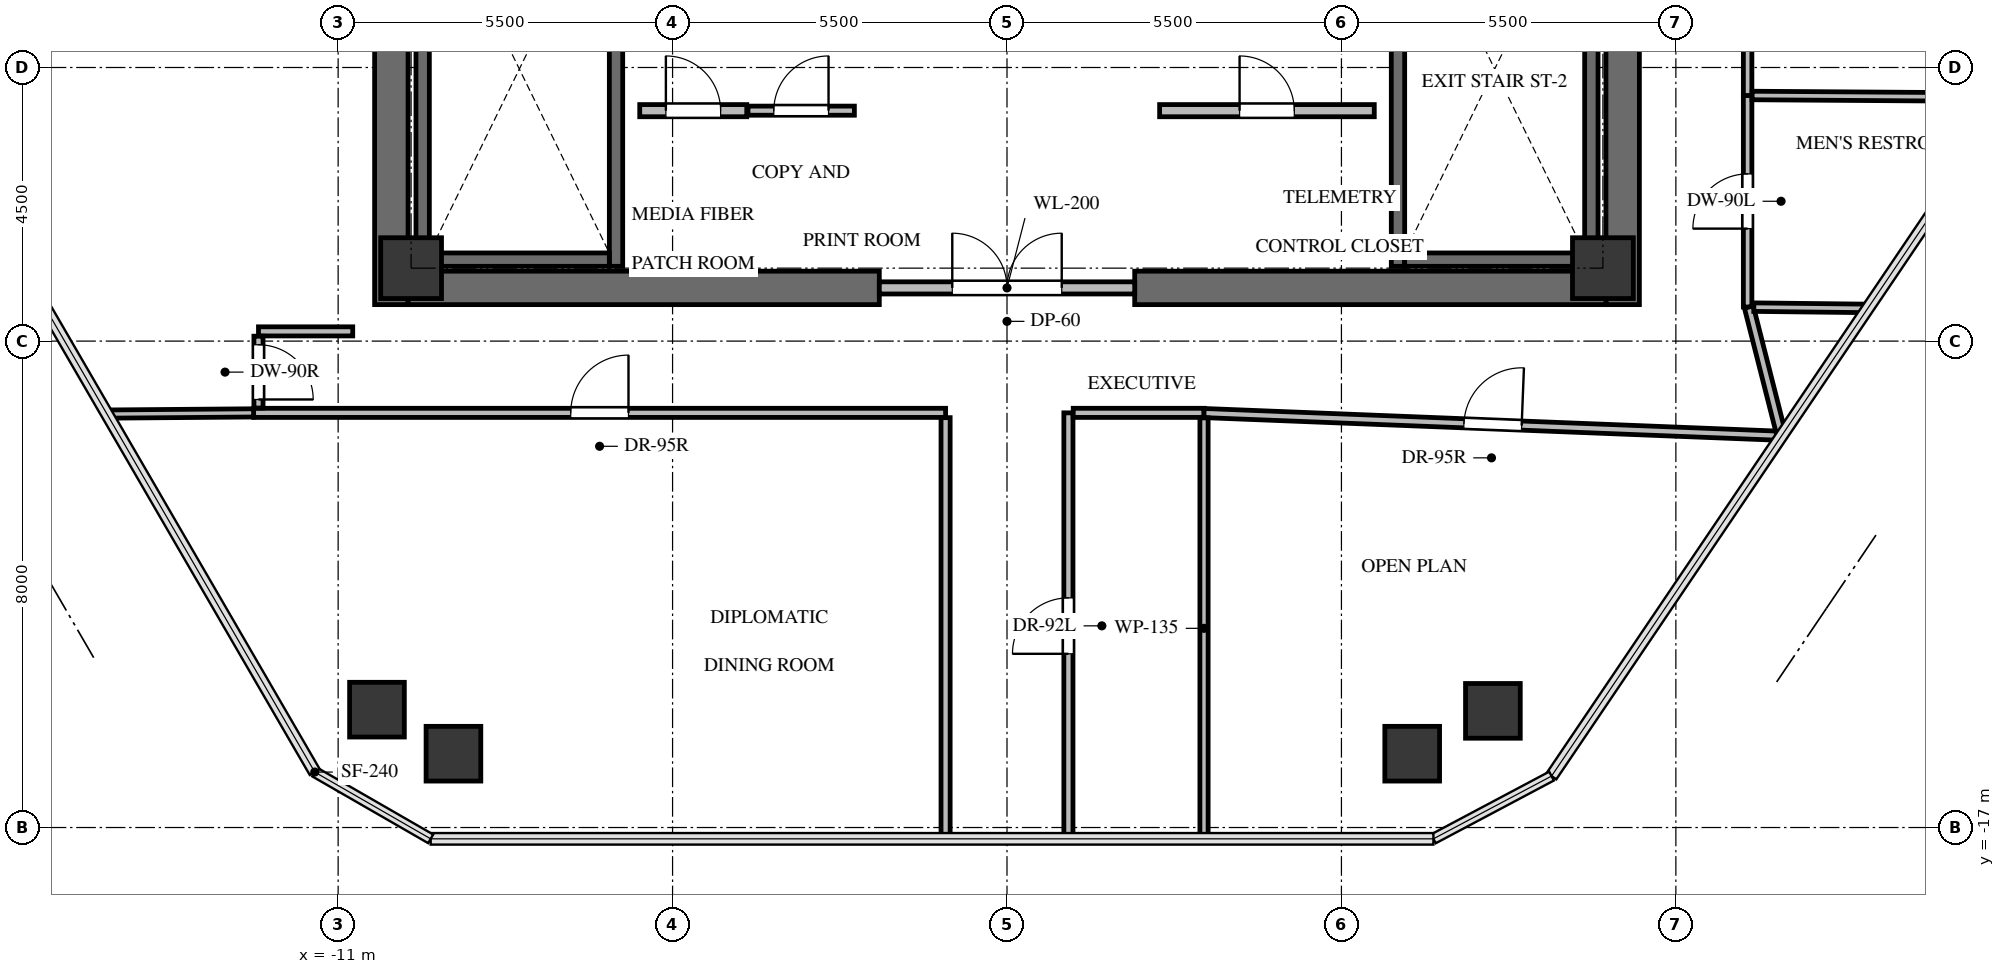
"""IFC4 building model, lengths in metres.
Left out: names, types, materials, properties, quantities, classifications, styles, units other than length and angle.
Written with IfcOpenShell. Run it as: python <this file> out.ifc"""

import sys

from ifc_helpers import new_model, si_unit, direction, frame, frame_2d, origin, origin_2d, place, context, subcontext, project, spatial, rectangle, extrude, source, transform, mapped, element, fill, save


model = new_model("IFC4")
c1 = context("Model", 3, precision=1e-05, world=origin(), true_north=direction((0.0, 1.0)))
c2 = subcontext(c1, "Body", "Model", "MODEL_VIEW")
j1 = project(units=[si_unit("LENGTHUNIT", "METRE"), si_unit("PLANEANGLEUNIT", "RADIAN")], contexts=[c1])
p1 = place(None, origin())
s1 = spatial("IfcSite", under=j1, at=p1, CompositionType="ELEMENT")
p2 = place(p1, origin())
s2 = spatial("IfcBuilding", under=s1, at=p2, CompositionType="ELEMENT")
p3 = place(p2, frame((0.0, 0.0, 218.3)))
s3 = spatial("IfcBuildingStorey", under=s2, at=p3, CompositionType="ELEMENT", Elevation=218.3)
for number, where, z_axis, x_axis in (
    (1, (-10.125, -8.4, 0.0), (0.0, 0.0, 1.0), (0.0, 1.0, 0.0)),
    (2, (10.125, -8.4, 0.0), (0.0, 0.0, 1.0), (0.0, 1.0, 0.0)),
):
    element("IfcWall", number, at=place(p3, frame(where, z_axis=z_axis, x_axis=x_axis)), inside=s3, PredefinedType="SHEAR", context=c2, shape_type="SweptSolid", body=[
        extrude(rectangle(XDim=16.8, YDim=0.55, at=frame_2d((8.4, 0.0))), origin(), (0.0, 0.0, 1.0), 3.3),
    ])
for number, where, z_axis, x_axis in (
    (3, (-9.85, -8.125, 0.0), (0.0, 0.0, 1.0), (1.0, 0.0, 0.0)),
    (4, (2.1, -8.125, 0.0), (0.0, 0.0, 1.0), (1.0, 0.0, 0.0)),
):
    element("IfcWall", number, at=place(p3, frame(where, z_axis=z_axis, x_axis=x_axis)), inside=s3, PredefinedType="SHEAR", context=c2, shape_type="SweptSolid", body=[
        extrude(rectangle(XDim=7.75, YDim=0.55, at=frame_2d((3.875, 0.0))), origin(), (0.0, 0.0, 1.0), 3.3),
    ])
p4 = place(p3, frame((-6.43, -7.77, -0.24), z_axis=(0.0, 0.0, 1.0), x_axis=(0.0, 1.0, 0.0)))
e5 = element("IfcWall", 5, at=p4, inside=s3, PredefinedType="SHEAR", context=c2, shape_type="SweptSolid", body=[
    extrude(rectangle(XDim=7.89, YDim=0.22, at=frame_2d((3.945, 0.0))), origin(), (0.0, 0.0, 1.0), 3.3),
])
p5 = place(p4, frame((6.32, 0.0, 0.0)))
e6 = element("IfcOpeningElement", 6, at=p5, cuts=e5, PredefinedType="OPENING", context=c2, shape_type="SweptSolid", body=[
    extrude(rectangle(XDim=1.05, YDim=2.15, at=frame_2d((0.525, 1.075))), frame((0.0, 0.12, 0.0), z_axis=(0.0, -1.0, 0.0), x_axis=(1.0, 0.0, 0.0)), (0.0, 0.0, 1.0), 0.24),
])
p6 = place(p3, frame((-9.61, 0.12, -0.24), z_axis=(0.0, 0.0, 1.0), x_axis=(0.0, -1.0, 0.0)))
e7 = element("IfcWall", 7, at=p6, inside=s3, PredefinedType="SHEAR", context=c2, shape_type="SweptSolid", body=[
    extrude(rectangle(XDim=7.89, YDim=0.22, at=frame_2d((3.945, 0.0))), origin(), (0.0, 0.0, 1.0), 3.3),
])
p7 = place(p3, frame((-9.5, -7.66, -0.24), z_axis=(0.0, 0.0, 1.0), x_axis=(1.0, 0.0, 0.0)))
e8 = element("IfcWall", 8, at=p7, inside=s3, PredefinedType="SHEAR", context=c2, shape_type="SweptSolid", body=[
    extrude(rectangle(XDim=2.96, YDim=0.22, at=frame_2d((1.48, 0.0))), origin(), (0.0, 0.0, 1.0), 3.3),
])
p8 = place(p3, frame((9.61, -7.77, -0.24), z_axis=(0.0, 0.0, 1.0), x_axis=(0.0, 1.0, 0.0)))
e9 = element("IfcWall", 9, at=p8, inside=s3, PredefinedType="SHEAR", context=c2, shape_type="SweptSolid", body=[
    extrude(rectangle(XDim=7.89, YDim=0.22, at=frame_2d((3.945, 0.0))), origin(), (0.0, 0.0, 1.0), 3.3),
])
p9 = place(p3, frame((6.43, 0.12, -0.24), z_axis=(0.0, 0.0, 1.0), x_axis=(0.0, -1.0, 0.0)))
e10 = element("IfcWall", 10, at=p9, inside=s3, PredefinedType="SHEAR", context=c2, shape_type="SweptSolid", body=[
    extrude(rectangle(XDim=7.89, YDim=0.22, at=frame_2d((3.945, 0.0))), origin(), (0.0, 0.0, 1.0), 3.3),
])
p10 = place(p9, frame((0.52, 0.0, 0.0)))
e11 = element("IfcOpeningElement", 11, at=p10, cuts=e10, PredefinedType="OPENING", context=c2, shape_type="SweptSolid", body=[
    extrude(rectangle(XDim=1.05, YDim=2.15, at=frame_2d((0.525, 1.075))), frame((0.0, 0.12, 0.0), z_axis=(0.0, -1.0, 0.0), x_axis=(1.0, 0.0, 0.0)), (0.0, 0.0, 1.0), 0.24),
])
p11 = place(p3, frame((6.54, -7.66, -0.24), z_axis=(0.0, 0.0, 1.0), x_axis=(1.0, 0.0, 0.0)))
e12 = element("IfcWall", 12, at=p11, inside=s3, PredefinedType="SHEAR", context=c2, shape_type="SweptSolid", body=[
    extrude(rectangle(XDim=2.96, YDim=0.22, at=frame_2d((1.48, 0.0))), origin(), (0.0, 0.0, 1.0), 3.3),
])
m1 = source(origin(), c2, "Body", "SweptSolid", [
    extrude(rectangle(XDim=1.0, YDim=1.0, at=origin_2d()), origin(), (0.0, 0.0, 1.0), 3.3),
])
for number, where, z_axis, x_axis in (
    (13, (-9.8, -7.8, -0.24), (0.0, 0.0, 1.0), (1.0, 0.0, 0.0)),
    (14, (9.8, -7.8, -0.24), (0.0, 0.0, 1.0), (1.0, 0.0, 0.0)),
):
    element("IfcColumn", number, at=place(p3, frame(where, z_axis=z_axis, x_axis=x_axis)), inside=s3, PredefinedType="COLUMN", context=c2, shape_type="MappedRepresentation", body=[
        mapped(m1, transform((0.0, 0.0, 0.0), x_axis=(1.0, 0.0, 0.0), y_axis=(0.0, 1.0, 0.0), z_axis=(0.0, 0.0, 1.0), scale=1.0)),
    ])
m2 = source(origin(), c2, "Body", "SweptSolid", [
    extrude(rectangle(XDim=0.9, YDim=0.9, at=origin_2d()), origin(), (0.0, 0.0, 1.0), 3.3),
])
for number, where, z_axis, x_axis in (
    (15, (-10.361, -15.062, -0.24), (0.0, 0.0, 1.0), (1.0, 0.0, 0.0)),
    (16, (7.991, -15.081, -0.24), (0.0, 0.0, 1.0), (1.0, 0.0, 0.0)),
    (17, (6.664, -15.786, -0.24), (0.0, 0.0, 1.0), (1.0, 0.0, 0.0)),
    (18, (-9.104, -15.786, -0.24), (0.0, 0.0, 1.0), (1.0, 0.0, 0.0)),
):
    element("IfcColumn", number, at=place(p3, frame(where, z_axis=z_axis, x_axis=x_axis)), inside=s3, PredefinedType="COLUMN", context=c2, shape_type="MappedRepresentation", body=[
        mapped(m2, transform((0.0, 0.0, 0.0), x_axis=(1.0, 0.0, 0.0), y_axis=(0.0, 1.0, 0.0), z_axis=(0.0, 0.0, 1.0), scale=1.0)),
    ])
p12 = place(p3, frame((-2.1, -8.125, 0.0), z_axis=(0.0, 0.0, 1.0), x_axis=(1.0, 0.0, 0.0)))
e19 = element("IfcWall", 19, at=p12, inside=s3, PredefinedType="SOLIDWALL", context=c2, shape_type="SweptSolid", body=[
    extrude(rectangle(XDim=4.2, YDim=0.2, at=frame_2d((2.1, 0.0))), origin(), (0.0, 0.0, 1.0), 3.045),
])
p13 = place(p12, frame((1.2, 0.0, 0.0)))
e20 = element("IfcOpeningElement", 20, at=p13, cuts=e19, PredefinedType="OPENING", context=c2, shape_type="SweptSolid", body=[
    extrude(rectangle(XDim=1.8, YDim=2.15, at=frame_2d((0.9, 1.075))), frame((0.0, 0.11, 0.0), z_axis=(0.0, -1.0, 0.0), x_axis=(1.0, 0.0, 0.0)), (0.0, 0.0, 1.0), 0.22),
])
p14 = place(p3, frame((-6.04, -5.21, 0.0), z_axis=(0.0, 0.0, 1.0), x_axis=(1.0, 0.0, 0.0)))
e21 = element("IfcWall", 21, at=p14, inside=s3, PredefinedType="SOLIDWALL", context=c2, shape_type="SweptSolid", body=[
    extrude(rectangle(XDim=1.76, YDim=0.2, at=frame_2d((0.88, 0.0))), origin(), (0.0, 0.0, 1.0), 3.045),
])
p15 = place(p14, frame((0.43, 0.0, 0.0)))
e22 = element("IfcOpeningElement", 22, at=p15, cuts=e21, PredefinedType="OPENING", context=c2, shape_type="SweptSolid", body=[
    extrude(rectangle(XDim=0.9, YDim=2.05, at=frame_2d((0.45, 1.025))), frame((0.0, 0.11, 0.0), z_axis=(0.0, -1.0, 0.0), x_axis=(1.0, 0.0, 0.0)), (0.0, 0.0, 1.0), 0.22),
])
p16 = place(p3, frame((-4.26, -5.21, 0.0), z_axis=(0.0, 0.0, 1.0), x_axis=(1.0, 0.0, 0.0)))
e23 = element("IfcWall", 23, at=p16, inside=s3, PredefinedType="PARTITIONING", context=c2, shape_type="SweptSolid", body=[
    extrude(rectangle(XDim=1.75, YDim=0.15, at=frame_2d((0.875, 0.0))), origin(), (0.0, 0.0, 1.0), 3.045),
])
p17 = place(p16, frame((0.425, 0.0, 0.0)))
e24 = element("IfcOpeningElement", 24, at=p17, cuts=e23, PredefinedType="OPENING", context=c2, shape_type="SweptSolid", body=[
    extrude(rectangle(XDim=0.9, YDim=2.05, at=frame_2d((0.45, 1.025))), frame((0.0, 0.085, 0.0), z_axis=(0.0, -1.0, 0.0), x_axis=(1.0, 0.0, 0.0)), (0.0, 0.0, 1.0), 0.17),
])
p18 = place(p3, frame((2.51, -5.21, 0.0), z_axis=(0.0, 0.0, 1.0), x_axis=(1.0, 0.0, 0.0)))
e25 = element("IfcWall", 25, at=p18, inside=s3, PredefinedType="SOLIDWALL", context=c2, shape_type="SweptSolid", body=[
    extrude(rectangle(XDim=3.53, YDim=0.2, at=frame_2d((1.765, 0.0))), origin(), (0.0, 0.0, 1.0), 3.045),
])
p19 = place(p18, frame((1.315, 0.0, 0.0)))
e26 = element("IfcOpeningElement", 26, at=p19, cuts=e25, PredefinedType="OPENING", context=c2, shape_type="SweptSolid", body=[
    extrude(rectangle(XDim=0.9, YDim=2.05, at=frame_2d((0.45, 1.025))), frame((0.0, 0.11, 0.0), z_axis=(0.0, -1.0, 0.0), x_axis=(1.0, 0.0, 0.0)), (0.0, 0.0, 1.0), 0.22),
])
p20 = place(p3, frame((12.18, -8.44, 0.0), z_axis=(0.0, 0.0, 1.0), x_axis=(0.0, 1.0, 0.0)))
e27 = element("IfcWall", 27, at=p20, inside=s3, PredefinedType="PARTITIONING", context=c2, shape_type="SweptSolid", body=[
    extrude(rectangle(XDim=3.48, YDim=0.14, at=frame_2d((1.74, 0.0))), origin(), (0.0, 0.0, 1.0), 2.399),
])
p21 = place(p20, frame((1.29, 0.0, 0.0)))
e28 = element("IfcOpeningElement", 28, at=p21, cuts=e27, PredefinedType="OPENING", context=c2, shape_type="SweptSolid", body=[
    extrude(rectangle(XDim=0.9, YDim=2.05, at=frame_2d((0.45, 1.025))), frame((0.0, 0.08, 0.0), z_axis=(0.0, -1.0, 0.0), x_axis=(1.0, 0.0, 0.0)), (0.0, 0.0, 1.0), 0.16),
])
p22 = place(p3, frame((12.18, -4.96, 0.0), z_axis=(0.0, 0.0, 1.0), x_axis=(0.0, 1.0, 0.0)))
e29 = element("IfcWall", 29, at=p22, inside=s3, PredefinedType="PARTITIONING", context=c2, shape_type="SweptSolid", body=[
    extrude(rectangle(XDim=3.4, YDim=0.14, at=frame_2d((1.7, 0.0))), origin(), (0.0, 0.0, 1.0), 3.045),
])
p23 = place(p22, frame((1.25, 0.0, 0.0)))
e30 = element("IfcOpeningElement", 30, at=p23, cuts=e29, PredefinedType="OPENING", context=c2, shape_type="SweptSolid", body=[
    extrude(rectangle(XDim=0.9, YDim=2.05, at=frame_2d((0.45, 1.025))), frame((0.0, 0.08, 0.0), z_axis=(0.0, -1.0, 0.0), x_axis=(1.0, 0.0, 0.0)), (0.0, 0.0, 1.0), 0.16),
])
p24 = place(p3, frame((-12.39, -10.18, 0.0), z_axis=(0.0, 0.0, 1.0), x_axis=(1.0, 0.0, 0.0)))
e31 = element("IfcWall", 31, at=p24, inside=s3, PredefinedType="PARTITIONING", context=c2, shape_type="SweptSolid", body=[
    extrude(rectangle(XDim=11.38, YDim=0.15, at=frame_2d((5.69, 0.0))), origin(), (0.0, 0.0, 1.0), 2.301),
])
p25 = place(p24, frame((5.215, 0.0, 0.0)))
e32 = element("IfcOpeningElement", 32, at=p25, cuts=e31, PredefinedType="OPENING", context=c2, shape_type="SweptSolid", body=[
    extrude(rectangle(XDim=0.95, YDim=2.1, at=frame_2d((0.475, 1.05))), frame((0.0, 0.085, 0.0), z_axis=(0.0, -1.0, 0.0), x_axis=(1.0, 0.0, 0.0)), (0.0, 0.0, 1.0), 0.17),
])
p26 = place(p3, frame((-1.01, -10.259, 0.0), z_axis=(0.0, 0.0, 1.0), x_axis=(0.0, -1.0, 0.0)))
e33 = element("IfcWall", 33, at=p26, inside=s3, PredefinedType="PARTITIONING", context=c2, shape_type="SweptSolid", body=[
    extrude(rectangle(XDim=6.927, YDim=0.15, at=frame_2d((3.463, 0.0))), origin(), (0.0, 0.0, 1.0), 2.399),
])
p27 = place(p3, frame((1.01, -17.186, 0.0), z_axis=(0.0, 0.0, 1.0), x_axis=(0.0, 1.0, 0.0)))
e34 = element("IfcWall", 34, at=p27, inside=s3, PredefinedType="PARTITIONING", context=c2, shape_type="SweptSolid", body=[
    extrude(rectangle(XDim=7.006, YDim=0.15, at=frame_2d((3.503, 0.0))), origin(), (0.0, 0.0, 1.0), 2.399),
])
p28 = place(p27, frame((3.043, 0.0, 0.0)))
e35 = element("IfcOpeningElement", 35, at=p28, cuts=e34, PredefinedType="OPENING", context=c2, shape_type="SweptSolid", body=[
    extrude(rectangle(XDim=0.92, YDim=2.1, at=frame_2d((0.46, 1.05))), frame((0.0, 0.085, 0.0), z_axis=(0.0, -1.0, 0.0), x_axis=(1.0, 0.0, 0.0)), (0.0, 0.0, 1.0), 0.17),
])
p29 = place(p3, frame((1.089, -10.18, 0.0), z_axis=(0.0, 0.0, 1.0), x_axis=(1.0, 0.0, 0.0)))
e36 = element("IfcWall", 36, at=p29, inside=s3, PredefinedType="PARTITIONING", context=c2, shape_type="SweptSolid", body=[
    extrude(rectangle(XDim=2.151, YDim=0.15, at=frame_2d((1.075, 0.0))), origin(), (0.0, 0.0, 1.0), 2.608),
])
p30 = place(p3, frame((3.24, -10.183, 0.0), z_axis=(0.0, 0.0, 1.0), x_axis=(0.999222675532, -0.039421373675, 0.0)))
e37 = element("IfcWall", 37, at=p30, inside=s3, PredefinedType="PARTITIONING", context=c2, shape_type="SweptSolid", body=[
    extrude(rectangle(XDim=9.506, YDim=0.15, at=frame_2d((4.753, 0.0))), origin(), (0.0, 0.0, 1.0), 2.301),
])
p31 = place(p30, frame((4.278, 0.0, 0.0)))
e38 = element("IfcOpeningElement", 38, at=p31, cuts=e37, PredefinedType="OPENING", context=c2, shape_type="SweptSolid", body=[
    extrude(rectangle(XDim=0.95, YDim=2.1, at=frame_2d((0.475, 1.05))), frame((0.0, 0.085, 0.0), z_axis=(0.0, -1.0, 0.0), x_axis=(1.0, 0.0, 0.0)), (0.0, 0.0, 1.0), 0.17),
])
p32 = place(p3, frame((12.719, -10.478, 0.0), z_axis=(0.0, 0.0, 1.0), x_axis=(-0.246494896578, 0.96914408937, 0.0)))
e39 = element("IfcWall", 39, at=p32, inside=s3, PredefinedType="PARTITIONING", context=c2, shape_type="SweptSolid", body=[
    extrude(rectangle(XDim=2.103, YDim=0.15, at=frame_2d((1.051, 0.0))), origin(), (0.0, 0.0, 1.0), 2.399),
])
p33 = place(p3, frame((-10.76, -8.84, 0.0), z_axis=(0.0, 0.0, 1.0), x_axis=(-1.0, 0.0, 0.0)))
e40 = element("IfcWall", 40, at=p33, inside=s3, PredefinedType="PARTITIONING", context=c2, shape_type="SweptSolid", body=[
    extrude(rectangle(XDim=1.55, YDim=0.15, at=frame_2d((0.775, 0.0))), origin(), (0.0, 0.0, 1.0), 3.045),
])
p34 = place(p3, frame((-12.31, -8.919, 0.0), z_axis=(0.0, 0.0, 1.0), x_axis=(0.0, -1.0, 0.0)))
e41 = element("IfcWall", 41, at=p34, inside=s3, PredefinedType="PARTITIONING", context=c2, shape_type="SweptSolid", body=[
    extrude(rectangle(XDim=1.182, YDim=0.15, at=frame_2d((0.591, 0.0))), origin(), (0.0, 0.0, 1.0), 3.045),
])
p35 = place(p34, frame((0.141, 0.0, 0.0)))
e42 = element("IfcOpeningElement", 42, at=p35, cuts=e41, PredefinedType="OPENING", context=c2, shape_type="SweptSolid", body=[
    extrude(rectangle(XDim=0.9, YDim=2.05, at=frame_2d((0.45, 1.025))), frame((0.0, 0.085, 0.0), z_axis=(0.0, -1.0, 0.0), x_axis=(1.0, 0.0, 0.0)), (0.0, 0.0, 1.0), 0.17),
])
p36 = place(p3, frame((12.254, -4.96, 0.0), z_axis=(0.0, 0.0, 1.0), x_axis=(0.999976630429, -0.006836563198, 0.0)))
e43 = element("IfcWall", 43, at=p36, inside=s3, PredefinedType="PARTITIONING", context=c2, shape_type="SweptSolid", body=[
    extrude(rectangle(XDim=4.25, YDim=0.14, at=frame_2d((2.125, 0.0))), origin(), (0.0, 0.0, 1.0), 2.399),
])
p37 = place(p3, frame((14.156, -8.462, 0.0), z_axis=(0.0, 0.0, 1.0), x_axis=(-0.999935742613, 0.011336253532, 0.0)))
e44 = element("IfcWall", 44, at=p37, inside=s3, PredefinedType="PARTITIONING", context=c2, shape_type="SweptSolid", body=[
    extrude(rectangle(XDim=1.874, YDim=0.14, at=frame_2d((0.937, 0.0))), origin(), (0.0, 0.0, 1.0), 2.399),
])
p38 = place(p3, frame((-14.802, -10.2, 0.0), z_axis=(0.0, 0.0, 1.0), x_axis=(0.999968020968, 0.007997314604, 0.0)))
e45 = element("IfcWall", 45, at=p38, inside=s3, PredefinedType="PARTITIONING", context=c2, shape_type="SweptSolid", body=[
    extrude(rectangle(XDim=2.412, YDim=0.135, at=frame_2d((1.206, 0.0))), origin(), (0.0, 0.0, 1.0), 2.399),
])
p39 = place(p3, frame((3.24, -10.262, 0.0), z_axis=(0.0, 0.0, 1.0), x_axis=(0.0, -1.0, 0.0)))
e46 = element("IfcWall", 46, at=p39, inside=s3, PredefinedType="PARTITIONING", context=c2, shape_type="SweptSolid", body=[
    extrude(rectangle(XDim=6.924, YDim=0.135, at=frame_2d((3.462, 0.0))), origin(), (0.0, 0.0, 1.0), 2.399),
])
m3 = source(origin(), c2, "Body", "SweptSolid", [
    extrude(rectangle(XDim=1.8, YDim=2.15, at=frame_2d((0.9, 1.075))), frame((0.0, 0.025, 0.0), z_axis=(0.0, -1.0, 0.0), x_axis=(1.0, 0.0, 0.0)), (0.0, 0.0, 1.0), 0.05),
])
p40 = place(p13, origin())
e47 = element("IfcDoor", 47, at=p40, inside=s3, OperationType="DOUBLE_DOOR_SINGLE_SWING", PredefinedType="DOOR", context=c2, shape_type="MappedRepresentation", body=[
    mapped(m3, transform((0.0, 0.0, 0.0), x_axis=(1.0, 0.0, 0.0), y_axis=(0.0, 1.0, 0.0), z_axis=(0.0, 0.0, 1.0), scale=1.0)),
])
fill(e20, e47)
m4 = source(origin(), c2, "Body", "SweptSolid", [
    extrude(rectangle(XDim=0.9, YDim=2.05, at=frame_2d((0.45, 1.025))), frame((0.0, 0.025, 0.0), z_axis=(0.0, -1.0, 0.0), x_axis=(1.0, 0.0, 0.0)), (0.0, 0.0, 1.0), 0.05),
])
p41 = place(p15, origin())
e48 = element("IfcDoor", 48, at=p41, inside=s3, OperationType="SINGLE_SWING_LEFT", PredefinedType="DOOR", context=c2, shape_type="MappedRepresentation", body=[
    mapped(m4, transform((0.0, 0.0, 0.0), x_axis=(1.0, 0.0, 0.0), y_axis=(0.0, 1.0, 0.0), z_axis=(0.0, 0.0, 1.0), scale=1.0)),
])
fill(e22, e48)
m5 = source(origin(), c2, "Body", "SweptSolid", [
    extrude(rectangle(XDim=0.9, YDim=2.05, at=frame_2d((0.45, 1.025))), frame((0.0, 0.025, 0.0), z_axis=(0.0, -1.0, 0.0), x_axis=(1.0, 0.0, 0.0)), (0.0, 0.0, 1.0), 0.05),
])
p42 = place(p17, origin())
e49 = element("IfcDoor", 49, at=p42, inside=s3, OperationType="SINGLE_SWING_RIGHT", PredefinedType="DOOR", context=c2, shape_type="MappedRepresentation", body=[
    mapped(m5, transform((0.0, 0.0, 0.0), x_axis=(1.0, 0.0, 0.0), y_axis=(0.0, 1.0, 0.0), z_axis=(0.0, 0.0, 1.0), scale=1.0)),
])
fill(e24, e49)
p43 = place(p19, origin())
e50 = element("IfcDoor", 50, at=p43, inside=s3, OperationType="SINGLE_SWING_LEFT", PredefinedType="DOOR", context=c2, shape_type="MappedRepresentation", body=[
    mapped(m4, transform((0.0, 0.0, 0.0), x_axis=(1.0, 0.0, 0.0), y_axis=(0.0, 1.0, 0.0), z_axis=(0.0, 0.0, 1.0), scale=1.0)),
])
fill(e26, e50)
m6 = source(origin(), c2, "Body", "SweptSolid", [
    extrude(rectangle(XDim=0.9, YDim=2.05, at=frame_2d((0.45, 1.025))), frame((0.0, 0.025, 0.0), z_axis=(0.0, -1.0, 0.0), x_axis=(1.0, 0.0, 0.0)), (0.0, 0.0, 1.0), 0.05),
])
p44 = place(p21, origin())
e51 = element("IfcDoor", 51, at=p44, inside=s3, OperationType="SINGLE_SWING_LEFT", PredefinedType="DOOR", context=c2, shape_type="MappedRepresentation", body=[
    mapped(m6, transform((0.0, 0.0, 0.0), x_axis=(1.0, 0.0, 0.0), y_axis=(0.0, 1.0, 0.0), z_axis=(0.0, 0.0, 1.0), scale=1.0)),
])
fill(e28, e51)
m7 = source(origin(), c2, "Body", "SweptSolid", [
    extrude(rectangle(XDim=0.95, YDim=2.1, at=frame_2d((0.475, 1.05))), frame((0.0, 0.025, 0.0), z_axis=(0.0, -1.0, 0.0), x_axis=(1.0, 0.0, 0.0)), (0.0, 0.0, 1.0), 0.05),
])
p45 = place(p25, origin())
e52 = element("IfcDoor", 52, at=p45, inside=s3, OperationType="SINGLE_SWING_RIGHT", PredefinedType="DOOR", context=c2, shape_type="MappedRepresentation", body=[
    mapped(m7, transform((0.0, 0.0, 0.0), x_axis=(1.0, 0.0, 0.0), y_axis=(0.0, 1.0, 0.0), z_axis=(0.0, 0.0, 1.0), scale=1.0)),
])
fill(e32, e52)
m8 = source(origin(), c2, "Body", "SweptSolid", [
    extrude(rectangle(XDim=0.92, YDim=2.1, at=frame_2d((0.46, 1.05))), frame((0.0, 0.025, 0.0), z_axis=(0.0, -1.0, 0.0), x_axis=(1.0, 0.0, 0.0)), (0.0, 0.0, 1.0), 0.05),
])
p46 = place(p28, origin())
e53 = element("IfcDoor", 53, at=p46, inside=s3, OperationType="SINGLE_SWING_LEFT", PredefinedType="DOOR", context=c2, shape_type="MappedRepresentation", body=[
    mapped(m8, transform((0.0, 0.0, 0.0), x_axis=(1.0, 0.0, 0.0), y_axis=(0.0, 1.0, 0.0), z_axis=(0.0, 0.0, 1.0), scale=1.0)),
])
fill(e35, e53)
p47 = place(p31, origin())
e54 = element("IfcDoor", 54, at=p47, inside=s3, OperationType="SINGLE_SWING_RIGHT", PredefinedType="DOOR", context=c2, shape_type="MappedRepresentation", body=[
    mapped(m7, transform((0.0, 0.0, 0.0), x_axis=(1.0, 0.0, 0.0), y_axis=(0.0, 1.0, 0.0), z_axis=(0.0, 0.0, 1.0), scale=1.0)),
])
fill(e38, e54)
m9 = source(origin(), c2, "Body", "SweptSolid", [
    extrude(rectangle(XDim=0.9, YDim=2.05, at=frame_2d((0.45, 1.025))), frame((0.0, 0.025, 0.0), z_axis=(0.0, -1.0, 0.0), x_axis=(1.0, 0.0, 0.0)), (0.0, 0.0, 1.0), 0.05),
])
p48 = place(p35, origin())
e55 = element("IfcDoor", 55, at=p48, inside=s3, OperationType="SINGLE_SWING_RIGHT", PredefinedType="DOOR", context=c2, shape_type="MappedRepresentation", body=[
    mapped(m9, transform((0.0, 0.0, 0.0), x_axis=(1.0, 0.0, 0.0), y_axis=(0.0, 1.0, 0.0), z_axis=(0.0, 0.0, 1.0), scale=1.0)),
])
fill(e42, e55)
save(model, sys.argv[1])
